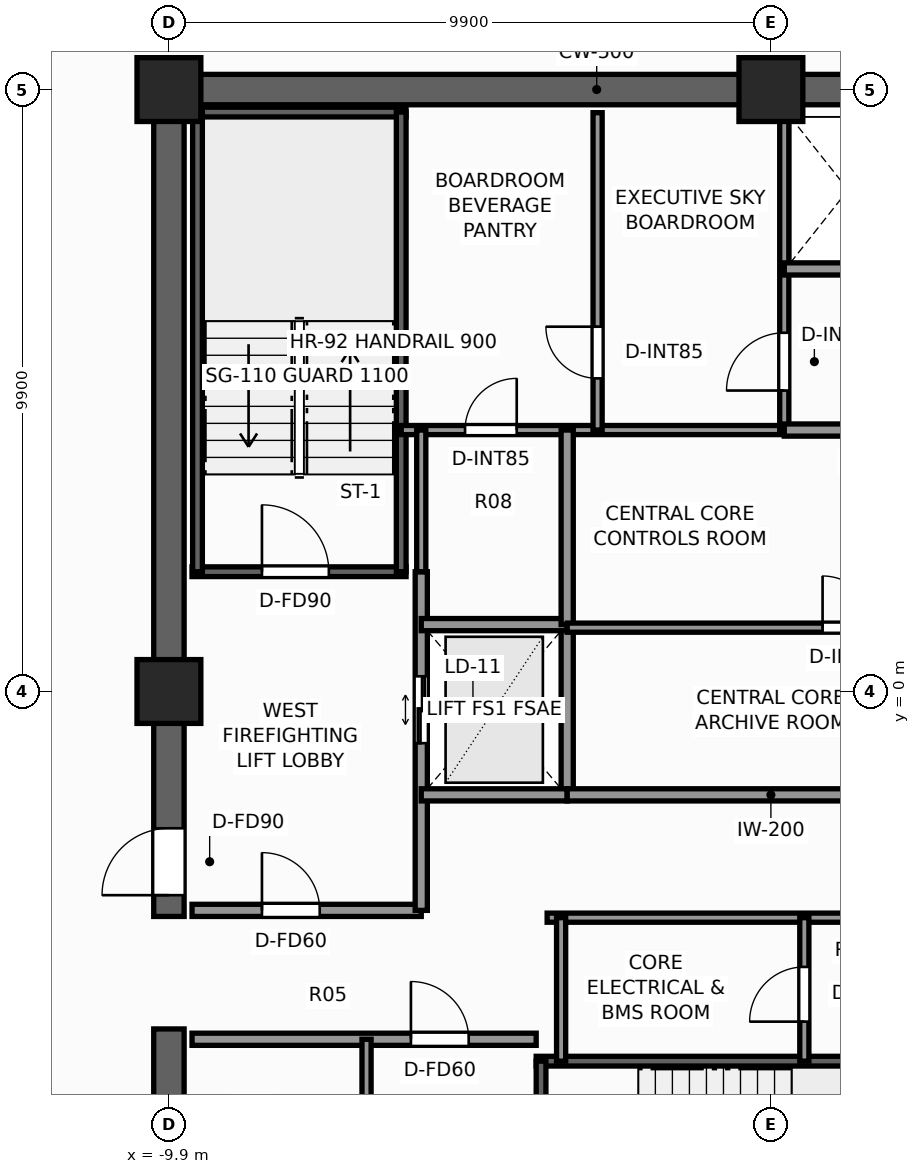
"""IFC4 building model, lengths in metres.
Left out: names, types, materials, properties, quantities, classifications, styles, units other than length and angle.
Written with IfcOpenShell. Run it as: python <this file> out.ifc"""

import sys

from ifc_helpers import new_model, si_unit, direction, frame, frame_2d, origin, origin_2d, place, context, subcontext, project, spatial, rectangle, extrude, element, fill, save


model = new_model("IFC4")
c1 = context("Model", 3, precision=1e-05, world=origin(), true_north=direction((0.0, 1.0)))
c2 = subcontext(c1, "Body", "Model", "MODEL_VIEW")
j1 = project(units=[si_unit("LENGTHUNIT", "METRE"), si_unit("PLANEANGLEUNIT", "RADIAN")], contexts=[c1])
p1 = place(None, origin())
s1 = spatial("IfcSite", under=j1, at=p1, CompositionType="ELEMENT")
p2 = place(p1, origin())
s2 = spatial("IfcBuilding", under=s1, at=p2, CompositionType="ELEMENT")
p3 = place(p2, frame((0.0, 0.0, 206.4)))
s3 = spatial("IfcBuildingStorey", under=s2, at=p3, CompositionType="ELEMENT", Elevation=206.4)
p4 = place(p3, frame((-10.15, 9.9, 0.0), z_axis=(0.0, 0.0, 1.0), x_axis=(1.0, 0.0, 0.0)))
e1 = element("IfcWall", 1, at=p4, inside=s3, PredefinedType="SHEAR", context=c2, shape_type="SweptSolid", body=[
    extrude(rectangle(XDim=14.57, YDim=0.5, at=frame_2d((7.285, 0.0))), origin(), (0.0, 0.0, 1.0), 3.3),
])
p5 = place(p3, frame((-9.9, -9.65, 0.0), z_axis=(0.0, 0.0, 1.0), x_axis=(0.0, 1.0, 0.0)))
e2 = element("IfcWall", 2, at=p5, inside=s3, PredefinedType="SHEAR", context=c2, shape_type="SweptSolid", body=[
    extrude(rectangle(XDim=4.1, YDim=0.5, at=frame_2d((2.05, 0.0))), origin(), (0.0, 0.0, 1.0), 3.3),
])
p6 = place(p3, frame((-9.9, -3.7, 0.0), z_axis=(0.0, 0.0, 1.0), x_axis=(0.0, 1.0, 0.0)))
e3 = element("IfcWall", 3, at=p6, inside=s3, PredefinedType="SHEAR", context=c2, shape_type="SweptSolid", body=[
    extrude(rectangle(XDim=13.35, YDim=0.5, at=frame_2d((6.675, 0.0))), origin(), (0.0, 0.0, 1.0), 3.3),
])
p7 = place(p6, frame((0.35, 0.0, 0.0)))
e4 = element("IfcOpeningElement", 4, at=p7, cuts=e3, PredefinedType="OPENING", context=c2, shape_type="SweptSolid", body=[
    extrude(rectangle(XDim=1.1, YDim=2.2, at=frame_2d((0.55, 1.1))), frame((0.0, 0.26, 0.0), z_axis=(0.0, -1.0, 0.0), x_axis=(1.0, 0.0, 0.0)), (0.0, 0.0, 1.0), 0.52),
])
for number, where, z_axis, x_axis in (
    (5, (-9.9, 9.9, 0.0), (0.0, 0.0, 1.0), (1.0, 0.0, 0.0)),
    (6, (0.0, 9.9, 0.0), (0.0, 0.0, 1.0), (1.0, 0.0, 0.0)),
    (7, (-9.9, 0.0, 0.0), (0.0, 0.0, 1.0), (1.0, 0.0, 0.0)),
):
    element("IfcColumn", number, at=place(p3, frame(where, z_axis=z_axis, x_axis=x_axis)), inside=s3, PredefinedType="COLUMN", context=c2, shape_type="SweptSolid", body=[
        extrude(rectangle(XDim=1.05, YDim=1.05, at=origin_2d()), origin(), (0.0, 0.0, 1.0), 3.3),
    ])
p8 = place(p3, frame((-9.52, 1.97, 0.0), z_axis=(0.0, 0.0, 1.0), x_axis=(1.0, 0.0, 0.0)))
e8 = element("IfcWall", 8, at=p8, inside=s3, PredefinedType="SHEAR", context=c2, shape_type="SweptSolid", body=[
    extrude(rectangle(XDim=3.52, YDim=0.16, at=frame_2d((1.76, 0.0))), origin(), (0.0, 0.0, 1.0), 3.3),
])
p9 = place(p8, frame((1.15, 0.0, 0.0)))
e9 = element("IfcOpeningElement", 9, at=p9, cuts=e8, PredefinedType="OPENING", context=c2, shape_type="SweptSolid", body=[
    extrude(rectangle(XDim=1.1, YDim=2.2, at=frame_2d((0.55, 1.1))), frame((0.0, 0.09, 0.0), z_axis=(0.0, -1.0, 0.0), x_axis=(1.0, 0.0, 0.0)), (0.0, 0.0, 1.0), 0.18),
])
p10 = place(p3, frame((-9.52, 9.53, 0.0), z_axis=(0.0, 0.0, 1.0), x_axis=(1.0, 0.0, 0.0)))
e10 = element("IfcWall", 10, at=p10, inside=s3, PredefinedType="SHEAR", context=c2, shape_type="SweptSolid", body=[
    extrude(rectangle(XDim=3.52, YDim=0.16, at=frame_2d((1.76, 0.0))), origin(), (0.0, 0.0, 1.0), 3.3),
])
for number, where, z_axis, x_axis in (
    (11, (-9.43, 1.97, 0.0), (0.0, 0.0, 1.0), (0.0, 1.0, 0.0)),
    (12, (-6.08, 1.97, 0.0), (0.0, 0.0, 1.0), (0.0, 1.0, 0.0)),
):
    element("IfcWall", number, at=place(p3, frame(where, z_axis=z_axis, x_axis=x_axis)), inside=s3, PredefinedType="SHEAR", context=c2, shape_type="SweptSolid", body=[
        extrude(rectangle(XDim=7.56, YDim=0.16, at=frame_2d((3.78, 0.0))), origin(), (0.0, 0.0, 1.0), 3.3),
    ])
p11 = place(p3, frame((-3.86, -6.08, 0.0), z_axis=(0.0, 0.0, 1.0), x_axis=(1.0, 0.0, 0.0)))
e13 = element("IfcWall", 13, at=p11, inside=s3, PredefinedType="SHEAR", context=c2, shape_type="SweptSolid", body=[
    extrude(rectangle(XDim=7.72, YDim=0.16, at=frame_2d((3.86, 0.0))), origin(), (0.0, 0.0, 1.0), 3.3),
])
p12 = place(p3, frame((-3.78, -9.43, 0.0), z_axis=(0.0, 0.0, 1.0), x_axis=(0.0, 1.0, 0.0)))
e14 = element("IfcWall", 14, at=p12, inside=s3, PredefinedType="SHEAR", context=c2, shape_type="SweptSolid", body=[
    extrude(rectangle(XDim=3.35, YDim=0.16, at=frame_2d((1.675, 0.0))), origin(), (0.0, 0.0, 1.0), 3.3),
])
p13 = place(p3, frame((-9.52, -3.6, 0.0), z_axis=(0.0, 0.0, 1.0), x_axis=(1.0, 0.0, 0.0)))
e15 = element("IfcWall", 15, at=p13, inside=s3, PredefinedType="SOLIDWALL", context=c2, shape_type="SweptSolid", body=[
    extrude(rectangle(XDim=3.77, YDim=0.2, at=frame_2d((1.885, 0.0))), origin(), (0.0, 0.0, 1.0), 3.08),
])
p14 = place(p13, frame((1.15, 0.0, 0.0)))
e16 = element("IfcOpeningElement", 16, at=p14, cuts=e15, PredefinedType="OPENING", context=c2, shape_type="SweptSolid", body=[
    extrude(rectangle(XDim=0.95, YDim=2.06, at=frame_2d((0.475, 1.03))), frame((0.0, 0.11, 0.0), z_axis=(0.0, -1.0, 0.0), x_axis=(1.0, 0.0, 0.0)), (0.0, 0.0, 1.0), 0.22),
])
p15 = place(p3, frame((-5.75, -3.6, 0.0), z_axis=(0.0, 0.0, 1.0), x_axis=(0.0, 1.0, 0.0)))
e17 = element("IfcWall", 17, at=p15, inside=s3, PredefinedType="SOLIDWALL", context=c2, shape_type="SweptSolid", body=[
    extrude(rectangle(XDim=5.57, YDim=0.2, at=frame_2d((2.785, 0.0))), origin(), (0.0, 0.0, 1.0), 3.08),
])
p16 = place(p15, frame((2.75, 0.0, 0.0)))
e18 = element("IfcOpeningElement", 18, at=p16, cuts=e17, PredefinedType="OPENING", context=c2, shape_type="SweptSolid", body=[
    extrude(rectangle(XDim=1.1, YDim=2.2, at=frame_2d((0.55, 1.1))), frame((0.0, 0.11, 0.0), z_axis=(0.0, -1.0, 0.0), x_axis=(1.0, 0.0, 0.0)), (0.0, 0.0, 1.0), 0.22),
])
p17 = place(p3, frame((-3.35, -1.7, 0.0), z_axis=(0.0, 0.0, 1.0), x_axis=(0.0, 1.0, 0.0)))
e19 = element("IfcWall", 19, at=p17, inside=s3, PredefinedType="SOLIDWALL", context=c2, shape_type="SweptSolid", body=[
    extrude(rectangle(XDim=2.8, YDim=0.2, at=frame_2d((1.4, 0.0))), origin(), (0.0, 0.0, 1.0), 3.08),
])
for number, where, z_axis, x_axis in (
    (20, (-5.75, -1.7, 0.0), (0.0, 0.0, 1.0), (1.0, 0.0, 0.0)),
    (21, (-5.75, 1.1, 0.0), (0.0, 0.0, 1.0), (1.0, 0.0, 0.0)),
):
    element("IfcWall", number, at=place(p3, frame(where, z_axis=z_axis, x_axis=x_axis)), inside=s3, PredefinedType="SOLIDWALL", context=c2, shape_type="SweptSolid", body=[
        extrude(rectangle(XDim=2.4, YDim=0.2, at=frame_2d((1.2, 0.0))), origin(), (0.0, 0.0, 1.0), 3.08),
    ])
p18 = place(p3, frame((-6.08, 4.3, 0.0), z_axis=(0.0, 0.0, 1.0), x_axis=(1.0, 0.0, 0.0)))
e22 = element("IfcWall", 22, at=p18, inside=s3, PredefinedType="PARTITIONING", context=c2, shape_type="SweptSolid", body=[
    extrude(rectangle(XDim=6.3, YDim=0.15, at=frame_2d((3.15, 0.0))), origin(), (0.0, 0.0, 1.0), 3.08),
])
p19 = place(p18, frame((1.05, 0.0, 0.0)))
e23 = element("IfcOpeningElement", 23, at=p19, cuts=e22, PredefinedType="OPENING", context=c2, shape_type="SweptSolid", body=[
    extrude(rectangle(XDim=0.85, YDim=2.03, at=frame_2d((0.425, 1.015))), frame((0.0, 0.085, 0.0), z_axis=(0.0, -1.0, 0.0), x_axis=(1.0, 0.0, 0.0)), (0.0, 0.0, 1.0), 0.17),
])
p20 = place(p3, frame((0.22, 4.3, 0.0), z_axis=(0.0, 0.0, 1.0), x_axis=(0.0, 1.0, 0.0)))
e24 = element("IfcWall", 24, at=p20, inside=s3, PredefinedType="PARTITIONING", context=c2, shape_type="SweptSolid", body=[
    extrude(rectangle(XDim=5.22, YDim=0.15, at=frame_2d((2.61, 0.0))), origin(), (0.0, 0.0, 1.0), 3.08),
])
p21 = place(p20, frame((0.65, 0.0, 0.0)))
e25 = element("IfcOpeningElement", 25, at=p21, cuts=e24, PredefinedType="OPENING", context=c2, shape_type="SweptSolid", body=[
    extrude(rectangle(XDim=0.95, YDim=2.06, at=frame_2d((0.475, 1.03))), frame((0.0, 0.085, 0.0), z_axis=(0.0, -1.0, 0.0), x_axis=(1.0, 0.0, 0.0)), (0.0, 0.0, 1.0), 0.17),
])
p22 = place(p3, frame((-2.85, 4.3, 0.0), z_axis=(0.0, 0.0, 1.0), x_axis=(0.0, 1.0, 0.0)))
e26 = element("IfcWall", 26, at=p22, inside=s3, PredefinedType="PARTITIONING", context=c2, shape_type="SweptSolid", body=[
    extrude(rectangle(XDim=5.22, YDim=0.15, at=frame_2d((2.61, 0.0))), origin(), (0.0, 0.0, 1.0), 3.08),
])
p23 = place(p22, frame((0.85, 0.0, 0.0)))
e27 = element("IfcOpeningElement", 27, at=p23, cuts=e26, PredefinedType="OPENING", context=c2, shape_type="SweptSolid", body=[
    extrude(rectangle(XDim=0.85, YDim=2.03, at=frame_2d((0.425, 1.015))), frame((0.0, 0.085, 0.0), z_axis=(0.0, -1.0, 0.0), x_axis=(1.0, 0.0, 0.0)), (0.0, 0.0, 1.0), 0.17),
])
p24 = place(p3, frame((0.22, 6.95, 0.0), z_axis=(0.0, 0.0, 1.0), x_axis=(1.0, 0.0, 0.0)))
e28 = element("IfcWall", 28, at=p24, inside=s3, PredefinedType="SOLIDWALL", context=c2, shape_type="SweptSolid", body=[
    extrude(rectangle(XDim=4.18, YDim=0.2, at=frame_2d((2.09, 0.0))), origin(), (0.0, 0.0, 1.0), 3.08),
])
p25 = place(p3, frame((-9.52, -5.72, 0.0), z_axis=(0.0, 0.0, 1.0), x_axis=(1.0, 0.0, 0.0)))
e29 = element("IfcWall", 29, at=p25, inside=s3, PredefinedType="SOLIDWALL", context=c2, shape_type="SweptSolid", body=[
    extrude(rectangle(XDim=5.66, YDim=0.2, at=frame_2d((2.83, 0.0))), origin(), (0.0, 0.0, 1.0), 3.08),
])
p26 = place(p25, frame((3.6, 0.0, 0.0)))
e30 = element("IfcOpeningElement", 30, at=p26, cuts=e29, PredefinedType="OPENING", context=c2, shape_type="SweptSolid", body=[
    extrude(rectangle(XDim=0.95, YDim=2.06, at=frame_2d((0.475, 1.03))), frame((0.0, 0.11, 0.0), z_axis=(0.0, -1.0, 0.0), x_axis=(1.0, 0.0, 0.0)), (0.0, 0.0, 1.0), 0.22),
])
p27 = place(p3, frame((-6.65, -9.52, 0.0), z_axis=(0.0, 0.0, 1.0), x_axis=(0.0, 1.0, 0.0)))
e31 = element("IfcWall", 31, at=p27, inside=s3, PredefinedType="PARTITIONING", context=c2, shape_type="SweptSolid", body=[
    extrude(rectangle(XDim=3.8, YDim=0.15, at=frame_2d((1.9, 0.0))), origin(), (0.0, 0.0, 1.0), 3.08),
])
p28 = place(p27, frame((0.9, 0.0, 0.0)))
e32 = element("IfcOpeningElement", 32, at=p28, cuts=e31, PredefinedType="OPENING", context=c2, shape_type="SweptSolid", body=[
    extrude(rectangle(XDim=0.85, YDim=2.03, at=frame_2d((0.425, 1.015))), frame((0.0, 0.085, 0.0), z_axis=(0.0, -1.0, 0.0), x_axis=(1.0, 0.0, 0.0)), (0.0, 0.0, 1.0), 0.17),
])
p29 = place(p3, frame((0.22, 4.3, 0.0), z_axis=(0.0, 0.0, 1.0), x_axis=(1.0, 0.0, 0.0)))
e33 = element("IfcWall", 33, at=p29, inside=s3, PredefinedType="SOLIDWALL", context=c2, shape_type="SweptSolid", body=[
    extrude(rectangle(XDim=3.13, YDim=0.2, at=frame_2d((1.565, 0.0))), origin(), (0.0, 0.0, 1.0), 3.08),
])
p30 = place(p29, frame((1.05, 0.0, 0.0)))
e34 = element("IfcOpeningElement", 34, at=p30, cuts=e33, PredefinedType="OPENING", context=c2, shape_type="SweptSolid", body=[
    extrude(rectangle(XDim=0.95, YDim=2.06, at=frame_2d((0.475, 1.03))), frame((0.0, 0.11, 0.0), z_axis=(0.0, -1.0, 0.0), x_axis=(1.0, 0.0, 0.0)), (0.0, 0.0, 1.0), 0.22),
])
p31 = place(p3, frame((-3.35, -1.7, 0.0), z_axis=(0.0, 0.0, 1.0), x_axis=(1.0, 0.0, 0.0)))
e35 = element("IfcWall", 35, at=p31, inside=s3, PredefinedType="SOLIDWALL", context=c2, shape_type="SweptSolid", body=[
    extrude(rectangle(XDim=6.7, YDim=0.2, at=frame_2d((3.35, 0.0))), origin(), (0.0, 0.0, 1.0), 3.08),
])
p32 = place(p3, frame((-3.35, 1.1, 0.0), z_axis=(0.0, 0.0, 1.0), x_axis=(0.0, 1.0, 0.0)))
e36 = element("IfcWall", 36, at=p32, inside=s3, PredefinedType="SOLIDWALL", context=c2, shape_type="SweptSolid", body=[
    extrude(rectangle(XDim=3.2, YDim=0.2, at=frame_2d((1.6, 0.0))), origin(), (0.0, 0.0, 1.0), 3.08),
])
p33 = place(p3, frame((-3.35, 1.05, 0.0), z_axis=(0.0, 0.0, 1.0), x_axis=(1.0, 0.0, 0.0)))
e37 = element("IfcWall", 37, at=p33, inside=s3, PredefinedType="PARTITIONING", context=c2, shape_type="SweptSolid", body=[
    extrude(rectangle(XDim=6.7, YDim=0.15, at=frame_2d((3.35, 0.0))), origin(), (0.0, 0.0, 1.0), 3.08),
])
p34 = place(p33, frame((4.2, 0.0, 0.0)))
e38 = element("IfcOpeningElement", 38, at=p34, cuts=e37, PredefinedType="OPENING", context=c2, shape_type="SweptSolid", body=[
    extrude(rectangle(XDim=0.85, YDim=2.03, at=frame_2d((0.425, 1.015))), frame((0.0, 0.085, 0.0), z_axis=(0.0, -1.0, 0.0), x_axis=(1.0, 0.0, 0.0)), (0.0, 0.0, 1.0), 0.17),
])
p35 = place(p3, frame((-3.68, -3.72, 0.0), z_axis=(0.0, 0.0, 1.0), x_axis=(1.0, 0.0, 0.0)))
e39 = element("IfcWall", 39, at=p35, inside=s3, PredefinedType="PARTITIONING", context=c2, shape_type="SweptSolid", body=[
    extrude(rectangle(XDim=7.36, YDim=0.15, at=frame_2d((3.68, 0.0))), origin(), (0.0, 0.0, 1.0), 3.08),
])
p36 = place(p3, frame((-3.45, -6.08, 0.0), z_axis=(0.0, 0.0, 1.0), x_axis=(0.0, 1.0, 0.0)))
e40 = element("IfcWall", 40, at=p36, inside=s3, PredefinedType="PARTITIONING", context=c2, shape_type="SweptSolid", body=[
    extrude(rectangle(XDim=2.36, YDim=0.15, at=frame_2d((1.18, 0.0))), origin(), (0.0, 0.0, 1.0), 3.08),
])
p37 = place(p3, frame((0.55, -6.08, 0.0), z_axis=(0.0, 0.0, 1.0), x_axis=(0.0, 1.0, 0.0)))
e41 = element("IfcWall", 41, at=p37, inside=s3, PredefinedType="PARTITIONING", context=c2, shape_type="SweptSolid", body=[
    extrude(rectangle(XDim=2.36, YDim=0.15, at=frame_2d((1.18, 0.0))), origin(), (0.0, 0.0, 1.0), 3.08),
])
p38 = place(p37, frame((0.65, 0.0, 0.0)))
e42 = element("IfcOpeningElement", 42, at=p38, cuts=e41, PredefinedType="OPENING", context=c2, shape_type="SweptSolid", body=[
    extrude(rectangle(XDim=0.9, YDim=2.06, at=frame_2d((0.45, 1.03))), frame((0.0, 0.085, 0.0), z_axis=(0.0, -1.0, 0.0), x_axis=(1.0, 0.0, 0.0)), (0.0, 0.0, 1.0), 0.17),
])
p39 = place(p3, frame((-5.75, 1.97, 0.0), z_axis=(0.0, 0.0, 1.0), x_axis=(0.0, 1.0, 0.0)))
e43 = element("IfcWall", 43, at=p39, inside=s3, PredefinedType="PARTITIONING", context=c2, shape_type="SweptSolid", body=[
    extrude(rectangle(XDim=2.33, YDim=0.15, at=frame_2d((1.165, 0.0))), origin(), (0.0, 0.0, 1.0), 3.08),
])
p40 = place(p9, origin())
e44 = element("IfcDoor", 44, at=p40, inside=s3, OperationType="SINGLE_SWING_LEFT", PredefinedType="DOOR", context=c2, shape_type="SweptSolid", body=[
    extrude(rectangle(XDim=1.1, YDim=2.2, at=frame_2d((0.55, 1.1))), frame((0.0, 0.025, 0.0), z_axis=(0.0, -1.0, 0.0), x_axis=(1.0, 0.0, 0.0)), (0.0, 0.0, 1.0), 0.05),
])
fill(e9, e44)
p41 = place(p7, origin())
e45 = element("IfcDoor", 45, at=p41, inside=s3, OperationType="SINGLE_SWING_LEFT", PredefinedType="DOOR", context=c2, shape_type="SweptSolid", body=[
    extrude(rectangle(XDim=1.1, YDim=2.2, at=frame_2d((0.55, 1.1))), frame((0.0, 0.025, 0.0), z_axis=(0.0, -1.0, 0.0), x_axis=(1.0, 0.0, 0.0)), (0.0, 0.0, 1.0), 0.05),
])
fill(e4, e45)
p42 = place(p16, origin())
e46 = element("IfcDoor", 46, at=p42, inside=s3, OperationType="DOUBLE_DOOR_SLIDING", PredefinedType="DOOR", context=c2, shape_type="SweptSolid", body=[
    extrude(rectangle(XDim=1.1, YDim=2.2, at=frame_2d((0.55, 1.1))), frame((0.0, 0.025, 0.0), z_axis=(0.0, -1.0, 0.0), x_axis=(1.0, 0.0, 0.0)), (0.0, 0.0, 1.0), 0.05),
])
fill(e18, e46)
p43 = place(p21, origin())
e47 = element("IfcDoor", 47, at=p43, inside=s3, OperationType="SINGLE_SWING_LEFT", PredefinedType="DOOR", context=c2, shape_type="SweptSolid", body=[
    extrude(rectangle(XDim=0.95, YDim=2.06, at=frame_2d((0.475, 1.03))), frame((0.0, 0.025, 0.0), z_axis=(0.0, -1.0, 0.0), x_axis=(1.0, 0.0, 0.0)), (0.0, 0.0, 1.0), 0.05),
])
fill(e25, e47)
p44 = place(p23, origin())
e48 = element("IfcDoor", 48, at=p44, inside=s3, OperationType="SINGLE_SWING_RIGHT", PredefinedType="DOOR", context=c2, shape_type="SweptSolid", body=[
    extrude(rectangle(XDim=0.85, YDim=2.03, at=frame_2d((0.425, 1.015))), frame((0.0, 0.025, 0.0), z_axis=(0.0, -1.0, 0.0), x_axis=(1.0, 0.0, 0.0)), (0.0, 0.0, 1.0), 0.05),
])
fill(e27, e48)
p45 = place(p26, origin())
e49 = element("IfcDoor", 49, at=p45, inside=s3, OperationType="SINGLE_SWING_LEFT", PredefinedType="DOOR", context=c2, shape_type="SweptSolid", body=[
    extrude(rectangle(XDim=0.95, YDim=2.06, at=frame_2d((0.475, 1.03))), frame((0.0, 0.025, 0.0), z_axis=(0.0, -1.0, 0.0), x_axis=(1.0, 0.0, 0.0)), (0.0, 0.0, 1.0), 0.05),
])
fill(e30, e49)
p46 = place(p14, origin())
e50 = element("IfcDoor", 50, at=p46, inside=s3, OperationType="SINGLE_SWING_LEFT", PredefinedType="DOOR", context=c2, shape_type="SweptSolid", body=[
    extrude(rectangle(XDim=0.95, YDim=2.06, at=frame_2d((0.475, 1.03))), frame((0.0, 0.025, 0.0), z_axis=(0.0, -1.0, 0.0), x_axis=(1.0, 0.0, 0.0)), (0.0, 0.0, 1.0), 0.05),
])
fill(e16, e50)
p47 = place(p34, origin())
e51 = element("IfcDoor", 51, at=p47, inside=s3, OperationType="SINGLE_SWING_LEFT", PredefinedType="DOOR", context=c2, shape_type="SweptSolid", body=[
    extrude(rectangle(XDim=0.85, YDim=2.03, at=frame_2d((0.425, 1.015))), frame((0.0, 0.025, 0.0), z_axis=(0.0, -1.0, 0.0), x_axis=(1.0, 0.0, 0.0)), (0.0, 0.0, 1.0), 0.05),
])
fill(e38, e51)
p48 = place(p38, origin())
e52 = element("IfcDoor", 52, at=p48, inside=s3, OperationType="SINGLE_SWING_LEFT", PredefinedType="DOOR", context=c2, shape_type="SweptSolid", body=[
    extrude(rectangle(XDim=0.9, YDim=2.06, at=frame_2d((0.45, 1.03))), frame((0.0, 0.025, 0.0), z_axis=(0.0, -1.0, 0.0), x_axis=(1.0, 0.0, 0.0)), (0.0, 0.0, 1.0), 0.05),
])
fill(e42, e52)
p49 = place(p19, origin())
e53 = element("IfcDoor", 53, at=p49, inside=s3, OperationType="SINGLE_SWING_RIGHT", PredefinedType="DOOR", context=c2, shape_type="SweptSolid", body=[
    extrude(rectangle(XDim=0.85, YDim=2.03, at=frame_2d((0.425, 1.015))), frame((0.0, 0.025, 0.0), z_axis=(0.0, -1.0, 0.0), x_axis=(1.0, 0.0, 0.0)), (0.0, 0.0, 1.0), 0.05),
])
fill(e23, e53)
save(model, sys.argv[1])
